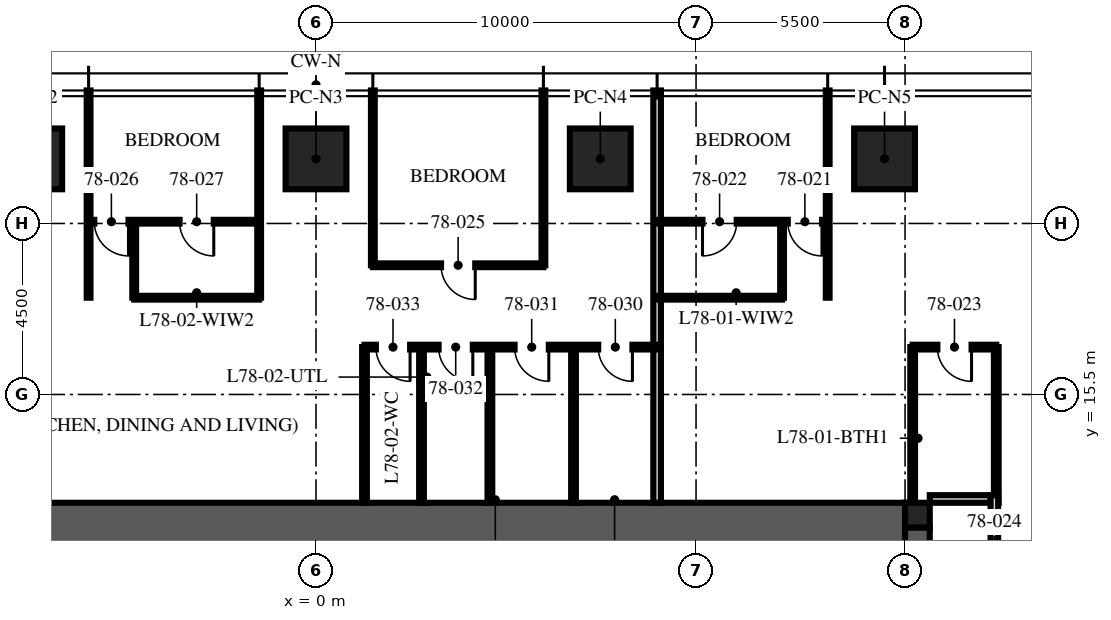
"""IFC4 building model, lengths in metres.
Left out: names, types, materials, properties, quantities, classifications, styles, units other than length and angle.
Written with IfcOpenShell. Run it as: python <this file> out.ifc"""

import sys

from ifc_helpers import new_model, si_unit, direction, frame, frame_2d, origin, origin_2d, place, context, subcontext, project, spatial, rectangle, extrude, element, fill, save


model = new_model("IFC4")
c1 = context("Model", 3, precision=1e-05, world=origin(), true_north=direction((0.0, 1.0)))
c2 = subcontext(c1, "Body", "Model", "MODEL_VIEW")
j1 = project(units=[si_unit("LENGTHUNIT", "METRE"), si_unit("PLANEANGLEUNIT", "RADIAN")], contexts=[c1])
p1 = place(None, origin())
s1 = spatial("IfcSite", under=j1, at=p1, CompositionType="ELEMENT")
p2 = place(p1, origin())
s2 = spatial("IfcBuilding", under=s1, at=p2, CompositionType="ELEMENT")
p3 = place(p2, frame((0.0, 0.0, 312.0)))
s3 = spatial("IfcBuildingStorey", under=s2, at=p3, CompositionType="ELEMENT", Elevation=312.0)
p4 = place(p3, frame((15.5, -12.0, -0.25), z_axis=(0.0, 0.0, 1.0), x_axis=(0.0, 1.0, 0.0)))
e1 = element("IfcWall", 1, at=p4, inside=s3, PredefinedType="SHEAR", context=c2, shape_type="SweptSolid", body=[
    extrude(rectangle(XDim=24.0, YDim=1.3, at=frame_2d((12.0, 0.0))), origin(), (0.0, 0.0, 1.0), 3.75),
])
p5 = place(p4, frame((3.125, 0.0, 0.25)))
e2 = element("IfcOpeningElement", 2, at=p5, cuts=e1, PredefinedType="OPENING", context=c2, shape_type="SweptSolid", body=[
    extrude(rectangle(XDim=1.2, YDim=2.1, at=frame_2d((0.6, 1.05))), frame((0.0, 0.66, 0.0), z_axis=(0.0, -1.0, 0.0), x_axis=(1.0, 0.0, 0.0)), (0.0, 0.0, 1.0), 1.32),
])
p6 = place(p4, frame((19.375, 0.0, 0.25)))
e3 = element("IfcOpeningElement", 3, at=p6, cuts=e1, PredefinedType="OPENING", context=c2, shape_type="SweptSolid", body=[
    extrude(rectangle(XDim=1.8, YDim=2.1, at=frame_2d((0.9, 1.05))), frame((0.0, 0.66, 0.0), z_axis=(0.0, -1.0, 0.0), x_axis=(1.0, 0.0, 0.0)), (0.0, 0.0, 1.0), 1.32),
])
p7 = place(p3, frame((-15.5, 12.0, -0.25), z_axis=(0.0, 0.0, 1.0), x_axis=(1.0, 0.0, 0.0)))
e4 = element("IfcWall", 4, at=p7, inside=s3, PredefinedType="SHEAR", context=c2, shape_type="SweptSolid", body=[
    extrude(rectangle(XDim=31.0, YDim=1.3, at=frame_2d((15.5, 0.0))), origin(), (0.0, 0.0, 1.0), 3.75),
])
p8 = place(p3, frame((15.825, 12.325, -0.25), z_axis=(0.0, 0.0, 1.0), x_axis=(1.0, 0.0, 0.0)))
e5 = element("IfcColumn", 5, at=p8, inside=s3, PredefinedType="COLUMN", context=c2, shape_type="SweptSolid", body=[
    extrude(rectangle(XDim=0.65, YDim=0.65, at=origin_2d()), origin(), (0.0, 0.0, 1.0), 3.75),
])
for number, where, z_axis, x_axis in (
    (6, (-7.48, 21.7, 0.0), (0.0, 0.0, 1.0), (1.0, 0.0, 0.0)),
    (7, (0.0, 21.7, 0.0), (0.0, 0.0, 1.0), (1.0, 0.0, 0.0)),
    (8, (7.48, 21.7, 0.0), (0.0, 0.0, 1.0), (1.0, 0.0, 0.0)),
    (9, (14.96, 21.7, 0.0), (0.0, 0.0, 1.0), (1.0, 0.0, 0.0)),
):
    element("IfcColumn", number, at=place(p3, frame(where, z_axis=z_axis, x_axis=x_axis)), inside=s3, PredefinedType="COLUMN", context=c2, shape_type="SweptSolid", body=[
        extrude(rectangle(XDim=1.6, YDim=1.6, at=origin_2d()), origin(), (0.0, 0.0, 1.0), 3.75),
    ])
p9 = place(p3, frame((16.15, 12.75, 0.0), z_axis=(0.0, 0.0, 1.0), x_axis=(1.0, 0.0, 0.0)))
e10 = element("IfcWall", 10, at=p9, inside=s3, PredefinedType="PARTITIONING", context=c2, shape_type="SweptSolid", body=[
    extrude(rectangle(XDim=1.6, YDim=0.2, at=frame_2d((0.8, 0.0))), origin(), (0.0, 0.0, 1.0), 2.6),
])
p10 = place(p3, frame((13.464, 18.046, 0.0), z_axis=(0.0, 0.0, 1.0), x_axis=(0.0, 1.0, 0.0)))
e11 = element("IfcWall", 11, at=p10, inside=s3, PredefinedType="PARTITIONING", context=c2, shape_type="SweptSolid", body=[
    extrude(rectangle(XDim=5.454, YDim=0.1, at=frame_2d((2.727, 0.0))), origin(), (0.0, 0.0, 1.0), 3.01),
])
p11 = place(p3, frame((8.976, 12.65, 0.0), z_axis=(0.0, 0.0, 1.0), x_axis=(0.0, 1.0, 0.0)))
e12 = element("IfcWall", 12, at=p11, inside=s3, PredefinedType="PARTITIONING", context=c2, shape_type="SweptSolid", body=[
    extrude(rectangle(XDim=10.85, YDim=0.2, at=frame_2d((5.425, 0.0))), origin(), (0.0, 0.0, 1.0), 3.01),
])
for number, where, z_axis, x_axis in (
    (13, (5.984, 18.9, 0.0), (0.0, 0.0, 1.0), (0.0, 1.0, 0.0)),
    (14, (1.496, 18.9, 0.0), (0.0, 0.0, 1.0), (0.0, 1.0, 0.0)),
):
    element("IfcWall", number, at=place(p3, frame(where, z_axis=z_axis, x_axis=x_axis)), inside=s3, PredefinedType="PARTITIONING", context=c2, shape_type="SweptSolid", body=[
        extrude(rectangle(XDim=4.6, YDim=0.1, at=frame_2d((2.3, 0.0))), origin(), (0.0, 0.0, 1.0), 3.01),
    ])
for number, where, z_axis, x_axis in (
    (15, (-1.496, 18.046, 0.0), (0.0, 0.0, 1.0), (0.0, 1.0, 0.0)),
    (16, (-5.984, 18.046, 0.0), (0.0, 0.0, 1.0), (0.0, 1.0, 0.0)),
):
    element("IfcWall", number, at=place(p3, frame(where, z_axis=z_axis, x_axis=x_axis)), inside=s3, PredefinedType="PARTITIONING", context=c2, shape_type="SweptSolid", body=[
        extrude(rectangle(XDim=5.454, YDim=0.1, at=frame_2d((2.727, 0.0))), origin(), (0.0, 0.0, 1.0), 3.01),
    ])
p12 = place(p3, frame((13.464, 20.046, 0.0), z_axis=(0.0, 0.0, 1.0), x_axis=(-1.0, 0.0, 0.0)))
e17 = element("IfcWall", 17, at=p12, inside=s3, PredefinedType="PARTITIONING", context=c2, shape_type="SweptSolid", body=[
    extrude(rectangle(XDim=4.488, YDim=0.1, at=frame_2d((2.244, 0.0))), origin(), (0.0, 0.0, 1.0), 2.91),
])
p13 = place(p12, frame((0.15, 0.0, 0.0)))
e18 = element("IfcOpeningElement", 18, at=p13, cuts=e17, PredefinedType="OPENING", context=c2, shape_type="SweptSolid", body=[
    extrude(rectangle(XDim=0.9, YDim=2.1, at=frame_2d((0.45, 1.05))), frame((0.0, 0.06, 0.0), z_axis=(0.0, -1.0, 0.0), x_axis=(1.0, 0.0, 0.0)), (0.0, 0.0, 1.0), 0.12),
])
p14 = place(p12, frame((2.394, 0.0, 0.0)))
e19 = element("IfcOpeningElement", 19, at=p14, cuts=e17, PredefinedType="OPENING", context=c2, shape_type="SweptSolid", body=[
    extrude(rectangle(XDim=0.9, YDim=2.1, at=frame_2d((0.45, 1.05))), frame((0.0, 0.06, 0.0), z_axis=(0.0, -1.0, 0.0), x_axis=(1.0, 0.0, 0.0)), (0.0, 0.0, 1.0), 0.12),
])
p15 = place(p3, frame((12.264, 18.046, 0.0), z_axis=(0.0, 0.0, 1.0), x_axis=(0.0, 1.0, 0.0)))
e20 = element("IfcWall", 20, at=p15, inside=s3, PredefinedType="PARTITIONING", context=c2, shape_type="SweptSolid", body=[
    extrude(rectangle(XDim=2.0, YDim=0.1, at=frame_2d((1.0, 0.0))), origin(), (0.0, 0.0, 1.0), 3.5),
])
p16 = place(p3, frame((12.264, 18.046, 0.0), z_axis=(0.0, 0.0, 1.0), x_axis=(-1.0, 0.0, 0.0)))
e21 = element("IfcWall", 21, at=p16, inside=s3, PredefinedType="PARTITIONING", context=c2, shape_type="SweptSolid", body=[
    extrude(rectangle(XDim=3.288, YDim=0.1, at=frame_2d((1.644, 0.0))), origin(), (0.0, 0.0, 1.0), 2.91),
])
p17 = place(p3, frame((17.9, 16.746, 0.0), z_axis=(0.0, 0.0, 1.0), x_axis=(-1.0, 0.0, 0.0)))
e22 = element("IfcWall", 22, at=p17, inside=s3, PredefinedType="PARTITIONING", context=c2, shape_type="SweptSolid", body=[
    extrude(rectangle(XDim=2.2, YDim=0.125, at=frame_2d((1.1, 0.0))), origin(), (0.0, 0.0, 1.0), 2.91),
])
p18 = place(p17, frame((0.65, 0.0, 0.0)))
e23 = element("IfcOpeningElement", 23, at=p18, cuts=e22, PredefinedType="OPENING", context=c2, shape_type="SweptSolid", body=[
    extrude(rectangle(XDim=0.9, YDim=2.1, at=frame_2d((0.45, 1.05))), frame((0.0, 0.073, 0.0), z_axis=(0.0, -1.0, 0.0), x_axis=(1.0, 0.0, 0.0)), (0.0, 0.0, 1.0), 0.145),
])
for number, where, z_axis, x_axis in (
    (24, (17.9, 12.65, 0.0), (0.0, 0.0, 1.0), (0.0, 1.0, 0.0)),
    (25, (15.7, 12.65, 0.0), (0.0, 0.0, 1.0), (0.0, 1.0, 0.0)),
):
    element("IfcWall", number, at=place(p3, frame(where, z_axis=z_axis, x_axis=x_axis)), inside=s3, PredefinedType="PARTITIONING", context=c2, shape_type="SweptSolid", body=[
        extrude(rectangle(XDim=4.096, YDim=0.125, at=frame_2d((2.048, 0.0))), origin(), (0.0, 0.0, 1.0), 2.6),
    ])
p19 = place(p3, frame((5.984, 18.9, 0.0), z_axis=(0.0, 0.0, 1.0), x_axis=(-1.0, 0.0, 0.0)))
e26 = element("IfcWall", 26, at=p19, inside=s3, PredefinedType="PARTITIONING", context=c2, shape_type="SweptSolid", body=[
    extrude(rectangle(XDim=4.488, YDim=0.1, at=frame_2d((2.244, 0.0))), origin(), (0.0, 0.0, 1.0), 2.91),
])
p20 = place(p19, frame((1.794, 0.0, 0.0)))
e27 = element("IfcOpeningElement", 27, at=p20, cuts=e26, PredefinedType="OPENING", context=c2, shape_type="SweptSolid", body=[
    extrude(rectangle(XDim=0.9, YDim=2.1, at=frame_2d((0.45, 1.05))), frame((0.0, 0.06, 0.0), z_axis=(0.0, -1.0, 0.0), x_axis=(1.0, 0.0, 0.0)), (0.0, 0.0, 1.0), 0.12),
])
p21 = place(p3, frame((-1.496, 20.046, 0.0), z_axis=(0.0, 0.0, 1.0), x_axis=(-1.0, 0.0, 0.0)))
e28 = element("IfcWall", 28, at=p21, inside=s3, PredefinedType="PARTITIONING", context=c2, shape_type="SweptSolid", body=[
    extrude(rectangle(XDim=4.488, YDim=0.1, at=frame_2d((2.244, 0.0))), origin(), (0.0, 0.0, 1.0), 2.91),
])
p22 = place(p21, frame((3.438, 0.0, 0.0)))
e29 = element("IfcOpeningElement", 29, at=p22, cuts=e28, PredefinedType="OPENING", context=c2, shape_type="SweptSolid", body=[
    extrude(rectangle(XDim=0.9, YDim=2.1, at=frame_2d((0.45, 1.05))), frame((0.0, 0.06, 0.0), z_axis=(0.0, -1.0, 0.0), x_axis=(1.0, 0.0, 0.0)), (0.0, 0.0, 1.0), 0.12),
])
p23 = place(p21, frame((1.194, 0.0, 0.0)))
e30 = element("IfcOpeningElement", 30, at=p23, cuts=e28, PredefinedType="OPENING", context=c2, shape_type="SweptSolid", body=[
    extrude(rectangle(XDim=0.9, YDim=2.1, at=frame_2d((0.45, 1.05))), frame((0.0, 0.06, 0.0), z_axis=(0.0, -1.0, 0.0), x_axis=(1.0, 0.0, 0.0)), (0.0, 0.0, 1.0), 0.12),
])
p24 = place(p3, frame((-4.784, 18.046, 0.0), z_axis=(0.0, 0.0, 1.0), x_axis=(0.0, 1.0, 0.0)))
e31 = element("IfcWall", 31, at=p24, inside=s3, PredefinedType="PARTITIONING", context=c2, shape_type="SweptSolid", body=[
    extrude(rectangle(XDim=2.0, YDim=0.1, at=frame_2d((1.0, 0.0))), origin(), (0.0, 0.0, 1.0), 3.5),
])
p25 = place(p3, frame((-1.496, 18.046, 0.0), z_axis=(0.0, 0.0, 1.0), x_axis=(-1.0, 0.0, 0.0)))
e32 = element("IfcWall", 32, at=p25, inside=s3, PredefinedType="PARTITIONING", context=c2, shape_type="SweptSolid", body=[
    extrude(rectangle(XDim=3.288, YDim=0.1, at=frame_2d((1.644, 0.0))), origin(), (0.0, 0.0, 1.0), 2.91),
])
p26 = place(p3, frame((8.976, 16.746, 0.0), z_axis=(0.0, 0.0, 1.0), x_axis=(-1.0, 0.0, 0.0)))
e33 = element("IfcWall", 33, at=p26, inside=s3, PredefinedType="PARTITIONING", context=c2, shape_type="SweptSolid", body=[
    extrude(rectangle(XDim=7.7, YDim=0.125, at=frame_2d((3.85, 0.0))), origin(), (0.0, 0.0, 1.0), 2.9),
])
p27 = place(p26, frame((0.65, 0.0, 0.0)))
e34 = element("IfcOpeningElement", 34, at=p27, cuts=e33, PredefinedType="OPENING", context=c2, shape_type="SweptSolid", body=[
    extrude(rectangle(XDim=0.9, YDim=2.1, at=frame_2d((0.45, 1.05))), frame((0.0, 0.073, 0.0), z_axis=(0.0, -1.0, 0.0), x_axis=(1.0, 0.0, 0.0)), (0.0, 0.0, 1.0), 0.145),
])
p28 = place(p26, frame((2.85, 0.0, 0.0)))
e35 = element("IfcOpeningElement", 35, at=p28, cuts=e33, PredefinedType="OPENING", context=c2, shape_type="SweptSolid", body=[
    extrude(rectangle(XDim=0.9, YDim=2.1, at=frame_2d((0.45, 1.05))), frame((0.0, 0.073, 0.0), z_axis=(0.0, -1.0, 0.0), x_axis=(1.0, 0.0, 0.0)), (0.0, 0.0, 1.0), 0.145),
])
p29 = place(p26, frame((4.85, 0.0, 0.0)))
e36 = element("IfcOpeningElement", 36, at=p29, cuts=e33, PredefinedType="OPENING", context=c2, shape_type="SweptSolid", body=[
    extrude(rectangle(XDim=0.9, YDim=2.1, at=frame_2d((0.45, 1.05))), frame((0.0, 0.073, 0.0), z_axis=(0.0, -1.0, 0.0), x_axis=(1.0, 0.0, 0.0)), (0.0, 0.0, 1.0), 0.145),
])
p30 = place(p26, frame((6.5, 0.0, 0.0)))
e37 = element("IfcOpeningElement", 37, at=p30, cuts=e33, PredefinedType="OPENING", context=c2, shape_type="SweptSolid", body=[
    extrude(rectangle(XDim=0.9, YDim=2.1, at=frame_2d((0.45, 1.05))), frame((0.0, 0.073, 0.0), z_axis=(0.0, -1.0, 0.0), x_axis=(1.0, 0.0, 0.0)), (0.0, 0.0, 1.0), 0.145),
])
for number, where, z_axis, x_axis in (
    (38, (6.776, 12.65, 0.0), (0.0, 0.0, 1.0), (0.0, 1.0, 0.0)),
    (39, (4.576, 12.65, 0.0), (0.0, 0.0, 1.0), (0.0, 1.0, 0.0)),
    (40, (2.776, 12.65, 0.0), (0.0, 0.0, 1.0), (0.0, 1.0, 0.0)),
    (41, (1.276, 12.65, 0.0), (0.0, 0.0, 1.0), (0.0, 1.0, 0.0)),
):
    element("IfcWall", number, at=place(p3, frame(where, z_axis=z_axis, x_axis=x_axis)), inside=s3, PredefinedType="PARTITIONING", context=c2, shape_type="SweptSolid", body=[
        extrude(rectangle(XDim=4.096, YDim=0.125, at=frame_2d((2.048, 0.0))), origin(), (0.0, 0.0, 1.0), 3.5),
    ])
p31 = place(p3, frame((17.85, -12.85, 0.0), z_axis=(0.0, 0.0, 1.0), x_axis=(0.0, 1.0, 0.0)))
e42 = element("IfcWall", 42, at=p31, inside=s3, PredefinedType="PARTITIONING", context=c2, shape_type="SweptSolid", body=[
    extrude(rectangle(XDim=25.7, YDim=0.2, at=frame_2d((12.85, 0.0))), origin(), (0.0, 0.0, 1.0), 2.9),
])
p32 = place(p31, frame((23.386, 0.0, 0.0)))
e43 = element("IfcOpeningElement", 43, at=p32, cuts=e42, PredefinedType="OPENING", context=c2, shape_type="SweptSolid", body=[
    extrude(rectangle(XDim=1.0, YDim=2.2, at=frame_2d((0.5, 1.1))), frame((0.0, 0.11, 0.0), z_axis=(0.0, -1.0, 0.0), x_axis=(1.0, 0.0, 0.0)), (0.0, 0.0, 1.0), 0.22),
])
p33 = place(p31, frame((5.1, 0.0, 0.0)))
e44 = element("IfcOpeningElement", 44, at=p33, cuts=e42, PredefinedType="OPENING", context=c2, shape_type="SweptSolid", body=[
    extrude(rectangle(XDim=1.0, YDim=2.2, at=frame_2d((0.5, 1.1))), frame((0.0, 0.11, 0.0), z_axis=(0.0, -1.0, 0.0), x_axis=(1.0, 0.0, 0.0)), (0.0, 0.0, 1.0), 0.22),
])
p34 = place(p13, origin())
e45 = element("IfcDoor", 45, at=p34, inside=s3, OperationType="SINGLE_SWING_LEFT", PredefinedType="DOOR", context=c2, shape_type="SweptSolid", body=[
    extrude(rectangle(XDim=0.9, YDim=2.1, at=frame_2d((0.45, 1.05))), frame((0.0, 0.025, 0.0), z_axis=(0.0, -1.0, 0.0), x_axis=(1.0, 0.0, 0.0)), (0.0, 0.0, 1.0), 0.05),
])
fill(e18, e45)
p35 = place(p14, origin())
e46 = element("IfcDoor", 46, at=p35, inside=s3, OperationType="SINGLE_SWING_RIGHT", PredefinedType="DOOR", context=c2, shape_type="SweptSolid", body=[
    extrude(rectangle(XDim=0.9, YDim=2.1, at=frame_2d((0.45, 1.05))), frame((0.0, 0.025, 0.0), z_axis=(0.0, -1.0, 0.0), x_axis=(1.0, 0.0, 0.0)), (0.0, 0.0, 1.0), 0.05),
])
fill(e19, e46)
p36 = place(p18, origin())
e47 = element("IfcDoor", 47, at=p36, inside=s3, OperationType="SINGLE_SWING_LEFT", PredefinedType="DOOR", context=c2, shape_type="SweptSolid", body=[
    extrude(rectangle(XDim=0.9, YDim=2.1, at=frame_2d((0.45, 1.05))), frame((0.0, 0.025, 0.0), z_axis=(0.0, -1.0, 0.0), x_axis=(1.0, 0.0, 0.0)), (0.0, 0.0, 1.0), 0.05),
])
fill(e23, e47)
p37 = place(p20, origin())
e48 = element("IfcDoor", 48, at=p37, inside=s3, OperationType="SINGLE_SWING_LEFT", PredefinedType="DOOR", context=c2, shape_type="SweptSolid", body=[
    extrude(rectangle(XDim=0.9, YDim=2.1, at=frame_2d((0.45, 1.05))), frame((0.0, 0.025, 0.0), z_axis=(0.0, -1.0, 0.0), x_axis=(1.0, 0.0, 0.0)), (0.0, 0.0, 1.0), 0.05),
])
fill(e27, e48)
p38 = place(p22, origin())
e49 = element("IfcDoor", 49, at=p38, inside=s3, OperationType="SINGLE_SWING_LEFT", PredefinedType="DOOR", context=c2, shape_type="SweptSolid", body=[
    extrude(rectangle(XDim=0.9, YDim=2.1, at=frame_2d((0.45, 1.05))), frame((0.0, 0.025, 0.0), z_axis=(0.0, -1.0, 0.0), x_axis=(1.0, 0.0, 0.0)), (0.0, 0.0, 1.0), 0.05),
])
fill(e29, e49)
p39 = place(p23, origin())
e50 = element("IfcDoor", 50, at=p39, inside=s3, OperationType="SINGLE_SWING_LEFT", PredefinedType="DOOR", context=c2, shape_type="SweptSolid", body=[
    extrude(rectangle(XDim=0.9, YDim=2.1, at=frame_2d((0.45, 1.05))), frame((0.0, 0.025, 0.0), z_axis=(0.0, -1.0, 0.0), x_axis=(1.0, 0.0, 0.0)), (0.0, 0.0, 1.0), 0.05),
])
fill(e30, e50)
p40 = place(p27, origin())
e51 = element("IfcDoor", 51, at=p40, inside=s3, OperationType="SINGLE_SWING_LEFT", PredefinedType="DOOR", context=c2, shape_type="SweptSolid", body=[
    extrude(rectangle(XDim=0.9, YDim=2.1, at=frame_2d((0.45, 1.05))), frame((0.0, 0.025, 0.0), z_axis=(0.0, -1.0, 0.0), x_axis=(1.0, 0.0, 0.0)), (0.0, 0.0, 1.0), 0.05),
])
fill(e34, e51)
p41 = place(p28, origin())
e52 = element("IfcDoor", 52, at=p41, inside=s3, OperationType="SINGLE_SWING_LEFT", PredefinedType="DOOR", context=c2, shape_type="SweptSolid", body=[
    extrude(rectangle(XDim=0.9, YDim=2.1, at=frame_2d((0.45, 1.05))), frame((0.0, 0.025, 0.0), z_axis=(0.0, -1.0, 0.0), x_axis=(1.0, 0.0, 0.0)), (0.0, 0.0, 1.0), 0.05),
])
fill(e35, e52)
p42 = place(p29, origin())
e53 = element("IfcDoor", 53, at=p42, inside=s3, OperationType="SINGLE_SWING_LEFT", PredefinedType="DOOR", context=c2, shape_type="SweptSolid", body=[
    extrude(rectangle(XDim=0.9, YDim=2.1, at=frame_2d((0.45, 1.05))), frame((0.0, 0.025, 0.0), z_axis=(0.0, -1.0, 0.0), x_axis=(1.0, 0.0, 0.0)), (0.0, 0.0, 1.0), 0.05),
])
fill(e36, e53)
p43 = place(p30, origin())
e54 = element("IfcDoor", 54, at=p43, inside=s3, OperationType="SINGLE_SWING_LEFT", PredefinedType="DOOR", context=c2, shape_type="SweptSolid", body=[
    extrude(rectangle(XDim=0.9, YDim=2.1, at=frame_2d((0.45, 1.05))), frame((0.0, 0.025, 0.0), z_axis=(0.0, -1.0, 0.0), x_axis=(1.0, 0.0, 0.0)), (0.0, 0.0, 1.0), 0.05),
])
fill(e37, e54)
save(model, sys.argv[1])
